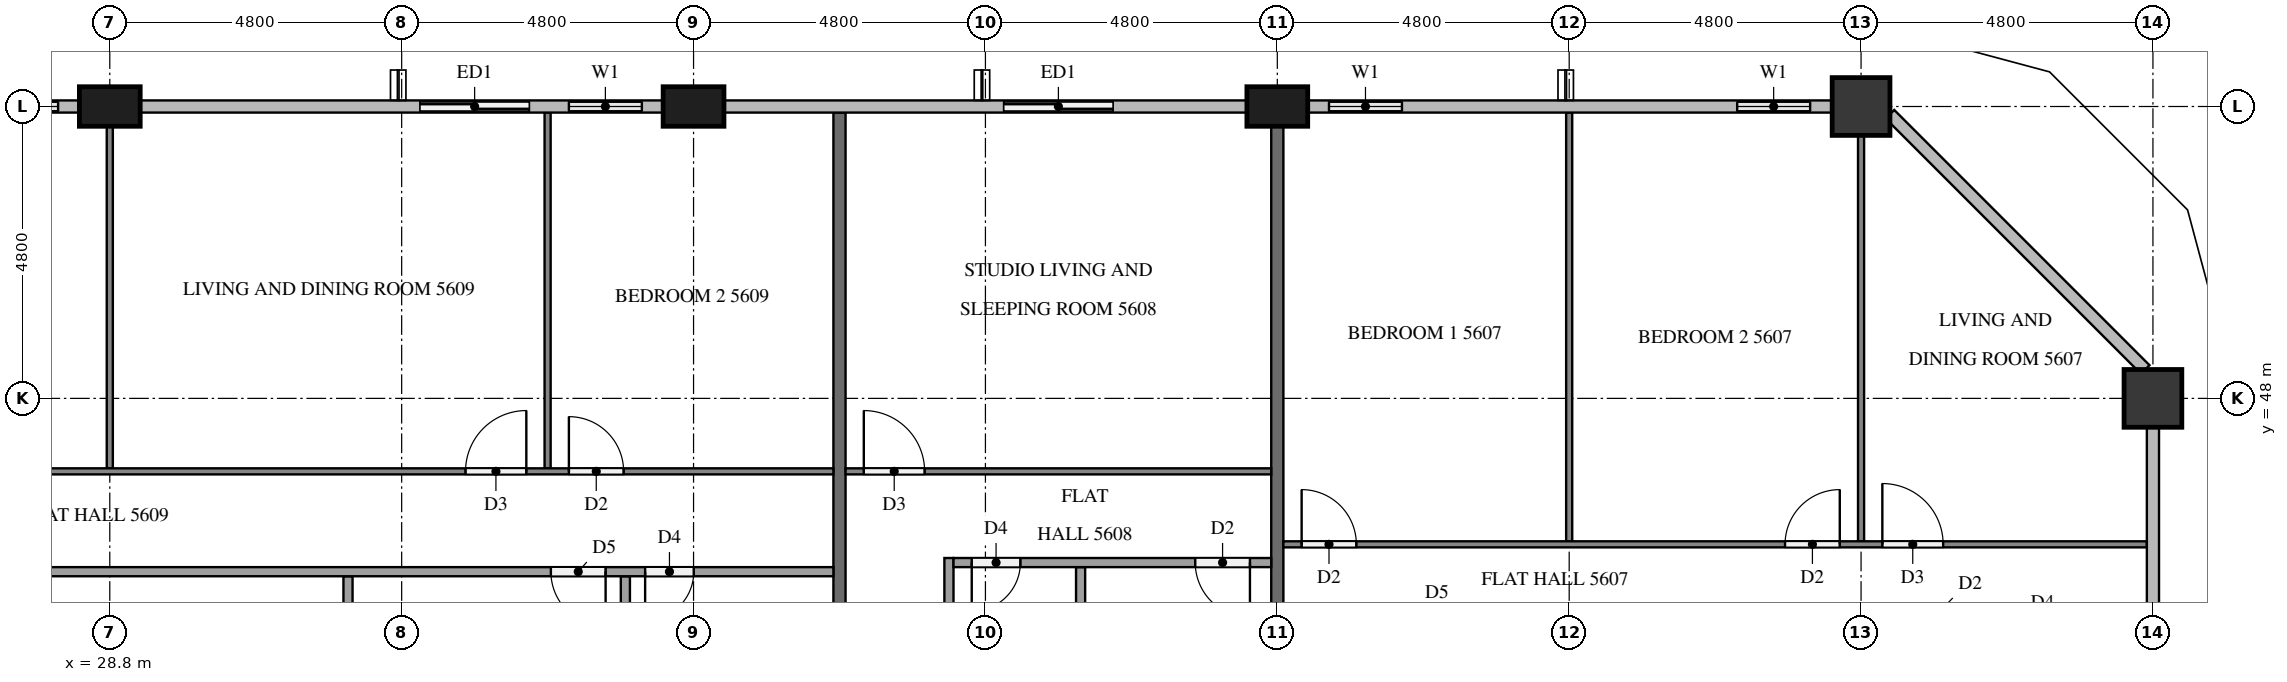
"""IFC4 building model, lengths in metres.
Left out: names, types, materials, properties, quantities, classifications, styles, units other than length and angle.
Written with IfcOpenShell. Run it as: python <this file> out.ifc"""

import sys

from ifc_helpers import new_model, si_unit, direction, frame, frame_2d, origin, origin_2d, place, context, subcontext, project, spatial, rectangle, extrude, element, fill, save


model = new_model("IFC4")
c1 = context("Model", 3, precision=1e-05, world=origin(), true_north=direction((0.0, 1.0)))
c2 = subcontext(c1, "Body", "Model", "MODEL_VIEW")
j1 = project(units=[si_unit("LENGTHUNIT", "METRE"), si_unit("PLANEANGLEUNIT", "RADIAN")], contexts=[c1])
p1 = place(None, origin())
s1 = spatial("IfcSite", under=j1, at=p1, CompositionType="ELEMENT")
p2 = place(p1, origin())
s2 = spatial("IfcBuilding", under=s1, at=p2, CompositionType="ELEMENT")
p3 = place(p2, frame((0.0, 0.0, 215.8)))
s3 = spatial("IfcBuildingStorey", under=s2, at=p3, CompositionType="ELEMENT", Elevation=215.8)
for number, where, z_axis, x_axis in (
    (1, (62.4, 48.0, 0.0), (0.0, 0.0, 1.0), (1.0, 0.0, 0.0)),
    (2, (57.6, 52.8, 0.0), (0.0, 0.0, 1.0), (1.0, 0.0, 0.0)),
):
    element("IfcColumn", number, at=place(p3, frame(where, z_axis=z_axis, x_axis=x_axis)), inside=s3, PredefinedType="COLUMN", context=c2, shape_type="SweptSolid", body=[
        extrude(rectangle(XDim=0.95, YDim=0.95, at=origin_2d()), origin(), (0.0, 0.0, 1.0), 3.2),
    ])
for number, where, z_axis, x_axis in (
    (3, (48.0, 52.8, 0.0), (0.0, 0.0, 1.0), (1.0, 0.0, 0.0)),
    (4, (38.4, 52.8, 0.0), (0.0, 0.0, 1.0), (1.0, 0.0, 0.0)),
    (5, (28.8, 52.8, 0.0), (0.0, 0.0, 1.0), (1.0, 0.0, 0.0)),
):
    element("IfcColumn", number, at=place(p3, frame(where, z_axis=z_axis, x_axis=x_axis)), inside=s3, PredefinedType="COLUMN", context=c2, shape_type="SweptSolid", body=[
        extrude(rectangle(XDim=1.0, YDim=0.65, at=origin_2d()), origin(), (0.0, 0.0, 1.0), 3.2),
    ])
p4 = place(p3, frame((57.125, 52.8, 0.0), z_axis=(0.0, 0.0, 1.0), x_axis=(-1.0, 0.0, 0.0)))
e6 = element("IfcWall", 6, at=p4, inside=s3, PredefinedType="SOLIDWALL", context=c2, shape_type="SweptSolid", body=[
    extrude(rectangle(XDim=1.925, YDim=0.15, at=frame_2d((0.962, 0.0))), origin(), (0.0, 0.0, 1.0), 3.2),
])
p5 = place(p4, frame((0.363, 0.0, 0.9)))
e7 = element("IfcOpeningElement", 7, at=p5, cuts=e6, PredefinedType="OPENING", context=c2, shape_type="SweptSolid", body=[
    extrude(rectangle(XDim=1.2, YDim=1.4, at=frame_2d((0.6, 0.7))), frame((0.0, 0.085, 0.0), z_axis=(0.0, -1.0, 0.0), x_axis=(1.0, 0.0, 0.0)), (0.0, 0.0, 1.0), 0.17),
])
p6 = place(p3, frame((50.4, 52.8, 0.0), z_axis=(0.0, 0.0, 1.0), x_axis=(-1.0, 0.0, 0.0)))
e8 = element("IfcWall", 8, at=p6, inside=s3, PredefinedType="SOLIDWALL", context=c2, shape_type="SweptSolid", body=[
    extrude(rectangle(XDim=1.9, YDim=0.15, at=frame_2d((0.95, 0.0))), origin(), (0.0, 0.0, 1.0), 3.2),
])
p7 = place(p6, frame((0.35, 0.0, 0.9)))
e9 = element("IfcOpeningElement", 9, at=p7, cuts=e8, PredefinedType="OPENING", context=c2, shape_type="SweptSolid", body=[
    extrude(rectangle(XDim=1.2, YDim=1.4, at=frame_2d((0.6, 0.7))), frame((0.0, 0.085, 0.0), z_axis=(0.0, -1.0, 0.0), x_axis=(1.0, 0.0, 0.0)), (0.0, 0.0, 1.0), 0.17),
])
p8 = place(p3, frame((45.6, 52.8, 0.0), z_axis=(0.0, 0.0, 1.0), x_axis=(-1.0, 0.0, 0.0)))
e10 = element("IfcWall", 10, at=p8, inside=s3, PredefinedType="SOLIDWALL", context=c2, shape_type="SweptSolid", body=[
    extrude(rectangle(XDim=2.4, YDim=0.15, at=frame_2d((1.2, 0.0))), origin(), (0.0, 0.0, 1.0), 3.2),
])
p9 = place(p8, frame((0.3, 0.0, 0.0)))
e11 = element("IfcOpeningElement", 11, at=p9, cuts=e10, PredefinedType="OPENING", context=c2, shape_type="SweptSolid", body=[
    extrude(rectangle(XDim=1.8, YDim=2.4, at=frame_2d((0.9, 1.2))), frame((0.0, 0.085, 0.0), z_axis=(0.0, -1.0, 0.0), x_axis=(1.0, 0.0, 0.0)), (0.0, 0.0, 1.0), 0.17),
])
p10 = place(p3, frame((37.9, 52.8, 0.0), z_axis=(0.0, 0.0, 1.0), x_axis=(-1.0, 0.0, 0.0)))
e12 = element("IfcWall", 12, at=p10, inside=s3, PredefinedType="SOLIDWALL", context=c2, shape_type="SweptSolid", body=[
    extrude(rectangle(XDim=4.3, YDim=0.15, at=frame_2d((2.15, 0.0))), origin(), (0.0, 0.0, 1.0), 3.2),
])
p11 = place(p10, frame((0.35, 0.0, 0.9)))
e13 = element("IfcOpeningElement", 13, at=p11, cuts=e12, PredefinedType="OPENING", context=c2, shape_type="SweptSolid", body=[
    extrude(rectangle(XDim=1.2, YDim=1.4, at=frame_2d((0.6, 0.7))), frame((0.0, 0.085, 0.0), z_axis=(0.0, -1.0, 0.0), x_axis=(1.0, 0.0, 0.0)), (0.0, 0.0, 1.0), 0.17),
])
p12 = place(p10, frame((2.2, 0.0, 0.0)))
e14 = element("IfcOpeningElement", 14, at=p12, cuts=e12, PredefinedType="OPENING", context=c2, shape_type="SweptSolid", body=[
    extrude(rectangle(XDim=1.8, YDim=2.4, at=frame_2d((0.9, 1.2))), frame((0.0, 0.085, 0.0), z_axis=(0.0, -1.0, 0.0), x_axis=(1.0, 0.0, 0.0)), (0.0, 0.0, 1.0), 0.17),
])
p13 = place(p3, frame((28.3, 52.8, 0.0), z_axis=(0.0, 0.0, 1.0), x_axis=(-1.0, 0.0, 0.0)))
e15 = element("IfcWall", 15, at=p13, inside=s3, PredefinedType="SOLIDWALL", context=c2, shape_type="SweptSolid", body=[
    extrude(rectangle(XDim=1.9, YDim=0.15, at=frame_2d((0.95, 0.0))), origin(), (0.0, 0.0, 1.0), 3.2),
])
p14 = place(p13, frame((0.35, 0.0, 0.9)))
e16 = element("IfcOpeningElement", 16, at=p14, cuts=e15, PredefinedType="OPENING", context=c2, shape_type="SweptSolid", body=[
    extrude(rectangle(XDim=1.2, YDim=1.4, at=frame_2d((0.6, 0.7))), frame((0.0, 0.085, 0.0), z_axis=(0.0, -1.0, 0.0), x_axis=(1.0, 0.0, 0.0)), (0.0, 0.0, 1.0), 0.17),
])
p15 = place(p3, frame((48.0, 52.475, 0.0), z_axis=(0.0, 0.0, 1.0), x_axis=(0.0, -1.0, 0.0)))
e17 = element("IfcWall", 17, at=p15, inside=s3, PredefinedType="PARTITIONING", context=c2, shape_type="SweptSolid", body=[
    extrude(rectangle(XDim=11.575, YDim=0.2, at=frame_2d((5.788, 0.0))), origin(), (0.0, 0.0, 1.0), 3.2),
])
p16 = place(p3, frame((40.8, 52.7, 0.0), z_axis=(0.0, 0.0, 1.0), x_axis=(0.0, -1.0, 0.0)))
e18 = element("IfcWall", 18, at=p16, inside=s3, PredefinedType="PARTITIONING", context=c2, shape_type="SweptSolid", body=[
    extrude(rectangle(XDim=11.8, YDim=0.2, at=frame_2d((5.9, 0.0))), origin(), (0.0, 0.0, 1.0), 3.2),
])
p17 = place(p3, frame((52.8, 45.65, 0.0), z_axis=(0.0, 0.0, 1.0), x_axis=(0.0, 1.0, 0.0)))
e19 = element("IfcWall", 19, at=p17, inside=s3, PredefinedType="PARTITIONING", context=c2, shape_type="SweptSolid", body=[
    extrude(rectangle(XDim=7.05, YDim=0.1, at=frame_2d((3.525, 0.0))), origin(), (0.0, 0.0, 1.0), 3.2),
])
p18 = place(p3, frame((57.6, 45.65, 0.0), z_axis=(0.0, 0.0, 1.0), x_axis=(0.0, 1.0, 0.0)))
e20 = element("IfcWall", 20, at=p18, inside=s3, PredefinedType="PARTITIONING", context=c2, shape_type="SweptSolid", body=[
    extrude(rectangle(XDim=6.675, YDim=0.1, at=frame_2d((3.337, 0.0))), origin(), (0.0, 0.0, 1.0), 3.2),
])
p19 = place(p3, frame((48.1, 45.6, 0.0), z_axis=(0.0, 0.0, 1.0), x_axis=(1.0, 0.0, 0.0)))
e21 = element("IfcWall", 21, at=p19, inside=s3, PredefinedType="PARTITIONING", context=c2, shape_type="SweptSolid", body=[
    extrude(rectangle(XDim=14.2, YDim=0.1, at=frame_2d((7.1, 0.0))), origin(), (0.0, 0.0, 1.0), 3.2),
])
p20 = place(p19, frame((0.3, 0.0, 0.0)))
e22 = element("IfcOpeningElement", 22, at=p20, cuts=e21, PredefinedType="OPENING", context=c2, shape_type="SweptSolid", body=[
    extrude(rectangle(XDim=0.9, YDim=2.1, at=frame_2d((0.45, 1.05))), frame((0.0, 0.06, 0.0), z_axis=(0.0, -1.0, 0.0), x_axis=(1.0, 0.0, 0.0)), (0.0, 0.0, 1.0), 0.12),
])
p21 = place(p19, frame((8.25, 0.0, 0.0)))
e23 = element("IfcOpeningElement", 23, at=p21, cuts=e21, PredefinedType="OPENING", context=c2, shape_type="SweptSolid", body=[
    extrude(rectangle(XDim=0.9, YDim=2.1, at=frame_2d((0.45, 1.05))), frame((0.0, 0.06, 0.0), z_axis=(0.0, -1.0, 0.0), x_axis=(1.0, 0.0, 0.0)), (0.0, 0.0, 1.0), 0.12),
])
p22 = place(p19, frame((9.85, 0.0, 0.0)))
e24 = element("IfcOpeningElement", 24, at=p22, cuts=e21, PredefinedType="OPENING", context=c2, shape_type="SweptSolid", body=[
    extrude(rectangle(XDim=1.0, YDim=2.1, at=frame_2d((0.5, 1.05))), frame((0.0, 0.06, 0.0), z_axis=(0.0, -1.0, 0.0), x_axis=(1.0, 0.0, 0.0)), (0.0, 0.0, 1.0), 0.12),
])
p23 = place(p3, frame((40.9, 46.8, 0.0), z_axis=(0.0, 0.0, 1.0), x_axis=(1.0, 0.0, 0.0)))
e25 = element("IfcWall", 25, at=p23, inside=s3, PredefinedType="PARTITIONING", context=c2, shape_type="SweptSolid", body=[
    extrude(rectangle(XDim=7.0, YDim=0.1, at=frame_2d((3.5, 0.0))), origin(), (0.0, 0.0, 1.0), 3.2),
])
p24 = place(p23, frame((0.3, 0.0, 0.0)))
e26 = element("IfcOpeningElement", 26, at=p24, cuts=e25, PredefinedType="OPENING", context=c2, shape_type="SweptSolid", body=[
    extrude(rectangle(XDim=1.0, YDim=2.1, at=frame_2d((0.5, 1.05))), frame((0.0, 0.06, 0.0), z_axis=(0.0, -1.0, 0.0), x_axis=(1.0, 0.0, 0.0)), (0.0, 0.0, 1.0), 0.12),
])
p25 = place(p3, frame((44.765, 40.9, 0.0), z_axis=(0.0, 0.0, 1.0), x_axis=(0.0, 1.0, 0.0)))
e27 = element("IfcWall", 27, at=p25, inside=s3, PredefinedType="PARTITIONING", context=c2, shape_type="SweptSolid", body=[
    extrude(rectangle(XDim=4.325, YDim=0.15, at=frame_2d((2.163, 0.0))), origin(), (0.0, 0.0, 1.0), 3.2),
])
p26 = place(p3, frame((42.6, 40.9, 0.0), z_axis=(0.0, 0.0, 1.0), x_axis=(0.0, 1.0, 0.0)))
e28 = element("IfcWall", 28, at=p26, inside=s3, PredefinedType="PARTITIONING", context=c2, shape_type="SweptSolid", body=[
    extrude(rectangle(XDim=4.475, YDim=0.15, at=frame_2d((2.238, 0.0))), origin(), (0.0, 0.0, 1.0), 3.2),
])
p27 = place(p3, frame((47.9, 45.3, 0.0), z_axis=(0.0, 0.0, 1.0), x_axis=(-1.0, 0.0, 0.0)))
e29 = element("IfcWall", 29, at=p27, inside=s3, PredefinedType="PARTITIONING", context=c2, shape_type="SweptSolid", body=[
    extrude(rectangle(XDim=5.225, YDim=0.15, at=frame_2d((2.612, 0.0))), origin(), (0.0, 0.0, 1.0), 3.2),
])
p28 = place(p27, frame((4.125, 0.0, 0.0)))
e30 = element("IfcOpeningElement", 30, at=p28, cuts=e29, PredefinedType="OPENING", context=c2, shape_type="SweptSolid", body=[
    extrude(rectangle(XDim=0.8, YDim=2.1, at=frame_2d((0.4, 1.05))), frame((0.0, 0.085, 0.0), z_axis=(0.0, -1.0, 0.0), x_axis=(1.0, 0.0, 0.0)), (0.0, 0.0, 1.0), 0.17),
])
p29 = place(p27, frame((0.35, 0.0, 0.0)))
e31 = element("IfcOpeningElement", 31, at=p29, cuts=e29, PredefinedType="OPENING", context=c2, shape_type="SweptSolid", body=[
    extrude(rectangle(XDim=0.9, YDim=2.1, at=frame_2d((0.45, 1.05))), frame((0.0, 0.085, 0.0), z_axis=(0.0, -1.0, 0.0), x_axis=(1.0, 0.0, 0.0)), (0.0, 0.0, 1.0), 0.17),
])
p30 = place(p3, frame((28.8, 46.85, 0.0), z_axis=(0.0, 0.0, 1.0), x_axis=(0.0, 1.0, 0.0)))
e32 = element("IfcWall", 32, at=p30, inside=s3, PredefinedType="PARTITIONING", context=c2, shape_type="SweptSolid", body=[
    extrude(rectangle(XDim=5.625, YDim=0.1, at=frame_2d((2.812, 0.0))), origin(), (0.0, 0.0, 1.0), 3.2),
])
p31 = place(p3, frame((36.0, 46.85, 0.0), z_axis=(0.0, 0.0, 1.0), x_axis=(0.0, 1.0, 0.0)))
e33 = element("IfcWall", 33, at=p31, inside=s3, PredefinedType="PARTITIONING", context=c2, shape_type="SweptSolid", body=[
    extrude(rectangle(XDim=5.85, YDim=0.1, at=frame_2d((2.925, 0.0))), origin(), (0.0, 0.0, 1.0), 3.2),
])
p32 = place(p3, frame((24.1, 46.8, 0.0), z_axis=(0.0, 0.0, 1.0), x_axis=(1.0, 0.0, 0.0)))
e34 = element("IfcWall", 34, at=p32, inside=s3, PredefinedType="PARTITIONING", context=c2, shape_type="SweptSolid", body=[
    extrude(rectangle(XDim=16.6, YDim=0.1, at=frame_2d((8.3, 0.0))), origin(), (0.0, 0.0, 1.0), 3.2),
])
p33 = place(p32, frame((0.3, 0.0, 0.0)))
e35 = element("IfcOpeningElement", 35, at=p33, cuts=e34, PredefinedType="OPENING", context=c2, shape_type="SweptSolid", body=[
    extrude(rectangle(XDim=0.9, YDim=2.1, at=frame_2d((0.45, 1.05))), frame((0.0, 0.06, 0.0), z_axis=(0.0, -1.0, 0.0), x_axis=(1.0, 0.0, 0.0)), (0.0, 0.0, 1.0), 0.12),
])
p34 = place(p32, frame((10.55, 0.0, 0.0)))
e36 = element("IfcOpeningElement", 36, at=p34, cuts=e34, PredefinedType="OPENING", context=c2, shape_type="SweptSolid", body=[
    extrude(rectangle(XDim=1.0, YDim=2.1, at=frame_2d((0.5, 1.05))), frame((0.0, 0.06, 0.0), z_axis=(0.0, -1.0, 0.0), x_axis=(1.0, 0.0, 0.0)), (0.0, 0.0, 1.0), 0.12),
])
p35 = place(p32, frame((12.25, 0.0, 0.0)))
e37 = element("IfcOpeningElement", 37, at=p35, cuts=e34, PredefinedType="OPENING", context=c2, shape_type="SweptSolid", body=[
    extrude(rectangle(XDim=0.9, YDim=2.1, at=frame_2d((0.45, 1.05))), frame((0.0, 0.06, 0.0), z_axis=(0.0, -1.0, 0.0), x_axis=(1.0, 0.0, 0.0)), (0.0, 0.0, 1.0), 0.12),
])
for number, where, z_axis, x_axis in (
    (38, (32.717, 40.9, 0.0), (0.0, 0.0, 1.0), (0.0, 1.0, 0.0)),
    (39, (37.279, 40.9, 0.0), (0.0, 0.0, 1.0), (0.0, 1.0, 0.0)),
):
    element("IfcWall", number, at=place(p3, frame(where, z_axis=z_axis, x_axis=x_axis)), inside=s3, PredefinedType="PARTITIONING", context=c2, shape_type="SweptSolid", body=[
        extrude(rectangle(XDim=4.175, YDim=0.15, at=frame_2d((2.087, 0.0))), origin(), (0.0, 0.0, 1.0), 3.2),
    ])
p36 = place(p3, frame((40.7, 45.15, 0.0), z_axis=(0.0, 0.0, 1.0), x_axis=(-1.0, 0.0, 0.0)))
e40 = element("IfcWall", 40, at=p36, inside=s3, PredefinedType="PARTITIONING", context=c2, shape_type="SweptSolid", body=[
    extrude(rectangle(XDim=14.825, YDim=0.15, at=frame_2d((7.413, 0.0))), origin(), (0.0, 0.0, 1.0), 3.2),
])
p37 = place(p36, frame((13.625, 0.0, 0.0)))
e41 = element("IfcOpeningElement", 41, at=p37, cuts=e40, PredefinedType="OPENING", context=c2, shape_type="SweptSolid", body=[
    extrude(rectangle(XDim=0.9, YDim=2.1, at=frame_2d((0.45, 1.05))), frame((0.0, 0.085, 0.0), z_axis=(0.0, -1.0, 0.0), x_axis=(1.0, 0.0, 0.0)), (0.0, 0.0, 1.0), 0.17),
])
p38 = place(p36, frame((3.746, 0.0, 0.0)))
e42 = element("IfcOpeningElement", 42, at=p38, cuts=e40, PredefinedType="OPENING", context=c2, shape_type="SweptSolid", body=[
    extrude(rectangle(XDim=0.9, YDim=2.1, at=frame_2d((0.45, 1.05))), frame((0.0, 0.085, 0.0), z_axis=(0.0, -1.0, 0.0), x_axis=(1.0, 0.0, 0.0)), (0.0, 0.0, 1.0), 0.17),
])
p39 = place(p36, frame((2.296, 0.0, 0.0)))
e43 = element("IfcOpeningElement", 43, at=p39, cuts=e40, PredefinedType="OPENING", context=c2, shape_type="SweptSolid", body=[
    extrude(rectangle(XDim=0.8, YDim=2.1, at=frame_2d((0.4, 1.05))), frame((0.0, 0.085, 0.0), z_axis=(0.0, -1.0, 0.0), x_axis=(1.0, 0.0, 0.0)), (0.0, 0.0, 1.0), 0.17),
])
p40 = place(p5, origin())
e44 = element("IfcWindow", 44, at=p40, inside=s3, PartitioningType="SINGLE_PANEL", PredefinedType="WINDOW", context=c2, shape_type="SweptSolid", body=[
    extrude(rectangle(XDim=1.2, YDim=1.4, at=frame_2d((0.6, 0.7))), frame((0.0, 0.03, 0.0), z_axis=(0.0, -1.0, 0.0), x_axis=(1.0, 0.0, 0.0)), (0.0, 0.0, 1.0), 0.06),
])
fill(e7, e44)
p41 = place(p7, origin())
e45 = element("IfcWindow", 45, at=p41, inside=s3, PartitioningType="SINGLE_PANEL", PredefinedType="WINDOW", context=c2, shape_type="SweptSolid", body=[
    extrude(rectangle(XDim=1.2, YDim=1.4, at=frame_2d((0.6, 0.7))), frame((0.0, 0.03, 0.0), z_axis=(0.0, -1.0, 0.0), x_axis=(1.0, 0.0, 0.0)), (0.0, 0.0, 1.0), 0.06),
])
fill(e9, e45)
p42 = place(p9, origin())
e46 = element("IfcDoor", 46, at=p42, inside=s3, OperationType="SLIDING_TO_LEFT", PredefinedType="DOOR", context=c2, shape_type="SweptSolid", body=[
    extrude(rectangle(XDim=1.8, YDim=2.4, at=frame_2d((0.9, 1.2))), frame((0.0, 0.025, 0.0), z_axis=(0.0, -1.0, 0.0), x_axis=(1.0, 0.0, 0.0)), (0.0, 0.0, 1.0), 0.05),
])
fill(e11, e46)
p43 = place(p11, origin())
e47 = element("IfcWindow", 47, at=p43, inside=s3, PartitioningType="SINGLE_PANEL", PredefinedType="WINDOW", context=c2, shape_type="SweptSolid", body=[
    extrude(rectangle(XDim=1.2, YDim=1.4, at=frame_2d((0.6, 0.7))), frame((0.0, 0.03, 0.0), z_axis=(0.0, -1.0, 0.0), x_axis=(1.0, 0.0, 0.0)), (0.0, 0.0, 1.0), 0.06),
])
fill(e13, e47)
p44 = place(p12, origin())
e48 = element("IfcDoor", 48, at=p44, inside=s3, OperationType="SLIDING_TO_RIGHT", PredefinedType="DOOR", context=c2, shape_type="SweptSolid", body=[
    extrude(rectangle(XDim=1.8, YDim=2.4, at=frame_2d((0.9, 1.2))), frame((0.0, 0.025, 0.0), z_axis=(0.0, -1.0, 0.0), x_axis=(1.0, 0.0, 0.0)), (0.0, 0.0, 1.0), 0.05),
])
fill(e14, e48)
p45 = place(p14, origin())
e49 = element("IfcWindow", 49, at=p45, inside=s3, PartitioningType="SINGLE_PANEL", PredefinedType="WINDOW", context=c2, shape_type="SweptSolid", body=[
    extrude(rectangle(XDim=1.2, YDim=1.4, at=frame_2d((0.6, 0.7))), frame((0.0, 0.03, 0.0), z_axis=(0.0, -1.0, 0.0), x_axis=(1.0, 0.0, 0.0)), (0.0, 0.0, 1.0), 0.06),
])
fill(e16, e49)
p46 = place(p20, origin())
e50 = element("IfcDoor", 50, at=p46, inside=s3, OperationType="SINGLE_SWING_LEFT", PredefinedType="DOOR", context=c2, shape_type="SweptSolid", body=[
    extrude(rectangle(XDim=0.9, YDim=2.1, at=frame_2d((0.45, 1.05))), frame((0.0, 0.025, 0.0), z_axis=(0.0, -1.0, 0.0), x_axis=(1.0, 0.0, 0.0)), (0.0, 0.0, 1.0), 0.05),
])
fill(e22, e50)
p47 = place(p21, origin())
e51 = element("IfcDoor", 51, at=p47, inside=s3, OperationType="SINGLE_SWING_RIGHT", PredefinedType="DOOR", context=c2, shape_type="SweptSolid", body=[
    extrude(rectangle(XDim=0.9, YDim=2.1, at=frame_2d((0.45, 1.05))), frame((0.0, 0.025, 0.0), z_axis=(0.0, -1.0, 0.0), x_axis=(1.0, 0.0, 0.0)), (0.0, 0.0, 1.0), 0.05),
])
fill(e23, e51)
p48 = place(p22, origin())
e52 = element("IfcDoor", 52, at=p48, inside=s3, OperationType="SINGLE_SWING_LEFT", PredefinedType="DOOR", context=c2, shape_type="SweptSolid", body=[
    extrude(rectangle(XDim=1.0, YDim=2.1, at=frame_2d((0.5, 1.05))), frame((0.0, 0.025, 0.0), z_axis=(0.0, -1.0, 0.0), x_axis=(1.0, 0.0, 0.0)), (0.0, 0.0, 1.0), 0.05),
])
fill(e24, e52)
p49 = place(p24, origin())
e53 = element("IfcDoor", 53, at=p49, inside=s3, OperationType="SINGLE_SWING_LEFT", PredefinedType="DOOR", context=c2, shape_type="SweptSolid", body=[
    extrude(rectangle(XDim=1.0, YDim=2.1, at=frame_2d((0.5, 1.05))), frame((0.0, 0.025, 0.0), z_axis=(0.0, -1.0, 0.0), x_axis=(1.0, 0.0, 0.0)), (0.0, 0.0, 1.0), 0.05),
])
fill(e26, e53)
p50 = place(p28, origin())
e54 = element("IfcDoor", 54, at=p50, inside=s3, OperationType="SINGLE_SWING_RIGHT", PredefinedType="DOOR", context=c2, shape_type="SweptSolid", body=[
    extrude(rectangle(XDim=0.8, YDim=2.1, at=frame_2d((0.4, 1.05))), frame((0.0, 0.025, 0.0), z_axis=(0.0, -1.0, 0.0), x_axis=(1.0, 0.0, 0.0)), (0.0, 0.0, 1.0), 0.05),
])
fill(e30, e54)
p51 = place(p29, origin())
e55 = element("IfcDoor", 55, at=p51, inside=s3, OperationType="SINGLE_SWING_LEFT", PredefinedType="DOOR", context=c2, shape_type="SweptSolid", body=[
    extrude(rectangle(XDim=0.9, YDim=2.1, at=frame_2d((0.45, 1.05))), frame((0.0, 0.025, 0.0), z_axis=(0.0, -1.0, 0.0), x_axis=(1.0, 0.0, 0.0)), (0.0, 0.0, 1.0), 0.05),
])
fill(e31, e55)
p52 = place(p34, origin())
e56 = element("IfcDoor", 56, at=p52, inside=s3, OperationType="SINGLE_SWING_RIGHT", PredefinedType="DOOR", context=c2, shape_type="SweptSolid", body=[
    extrude(rectangle(XDim=1.0, YDim=2.1, at=frame_2d((0.5, 1.05))), frame((0.0, 0.025, 0.0), z_axis=(0.0, -1.0, 0.0), x_axis=(1.0, 0.0, 0.0)), (0.0, 0.0, 1.0), 0.05),
])
fill(e36, e56)
p53 = place(p35, origin())
e57 = element("IfcDoor", 57, at=p53, inside=s3, OperationType="SINGLE_SWING_LEFT", PredefinedType="DOOR", context=c2, shape_type="SweptSolid", body=[
    extrude(rectangle(XDim=0.9, YDim=2.1, at=frame_2d((0.45, 1.05))), frame((0.0, 0.025, 0.0), z_axis=(0.0, -1.0, 0.0), x_axis=(1.0, 0.0, 0.0)), (0.0, 0.0, 1.0), 0.05),
])
fill(e37, e57)
p54 = place(p38, origin())
e58 = element("IfcDoor", 58, at=p54, inside=s3, OperationType="SINGLE_SWING_LEFT", PredefinedType="DOOR", context=c2, shape_type="SweptSolid", body=[
    extrude(rectangle(XDim=0.9, YDim=2.1, at=frame_2d((0.45, 1.05))), frame((0.0, 0.025, 0.0), z_axis=(0.0, -1.0, 0.0), x_axis=(1.0, 0.0, 0.0)), (0.0, 0.0, 1.0), 0.05),
])
fill(e42, e58)
p55 = place(p39, origin())
e59 = element("IfcDoor", 59, at=p55, inside=s3, OperationType="SINGLE_SWING_RIGHT", PredefinedType="DOOR", context=c2, shape_type="SweptSolid", body=[
    extrude(rectangle(XDim=0.8, YDim=2.1, at=frame_2d((0.4, 1.05))), frame((0.0, 0.025, 0.0), z_axis=(0.0, -1.0, 0.0), x_axis=(1.0, 0.0, 0.0)), (0.0, 0.0, 1.0), 0.05),
])
fill(e43, e59)
save(model, sys.argv[1])
